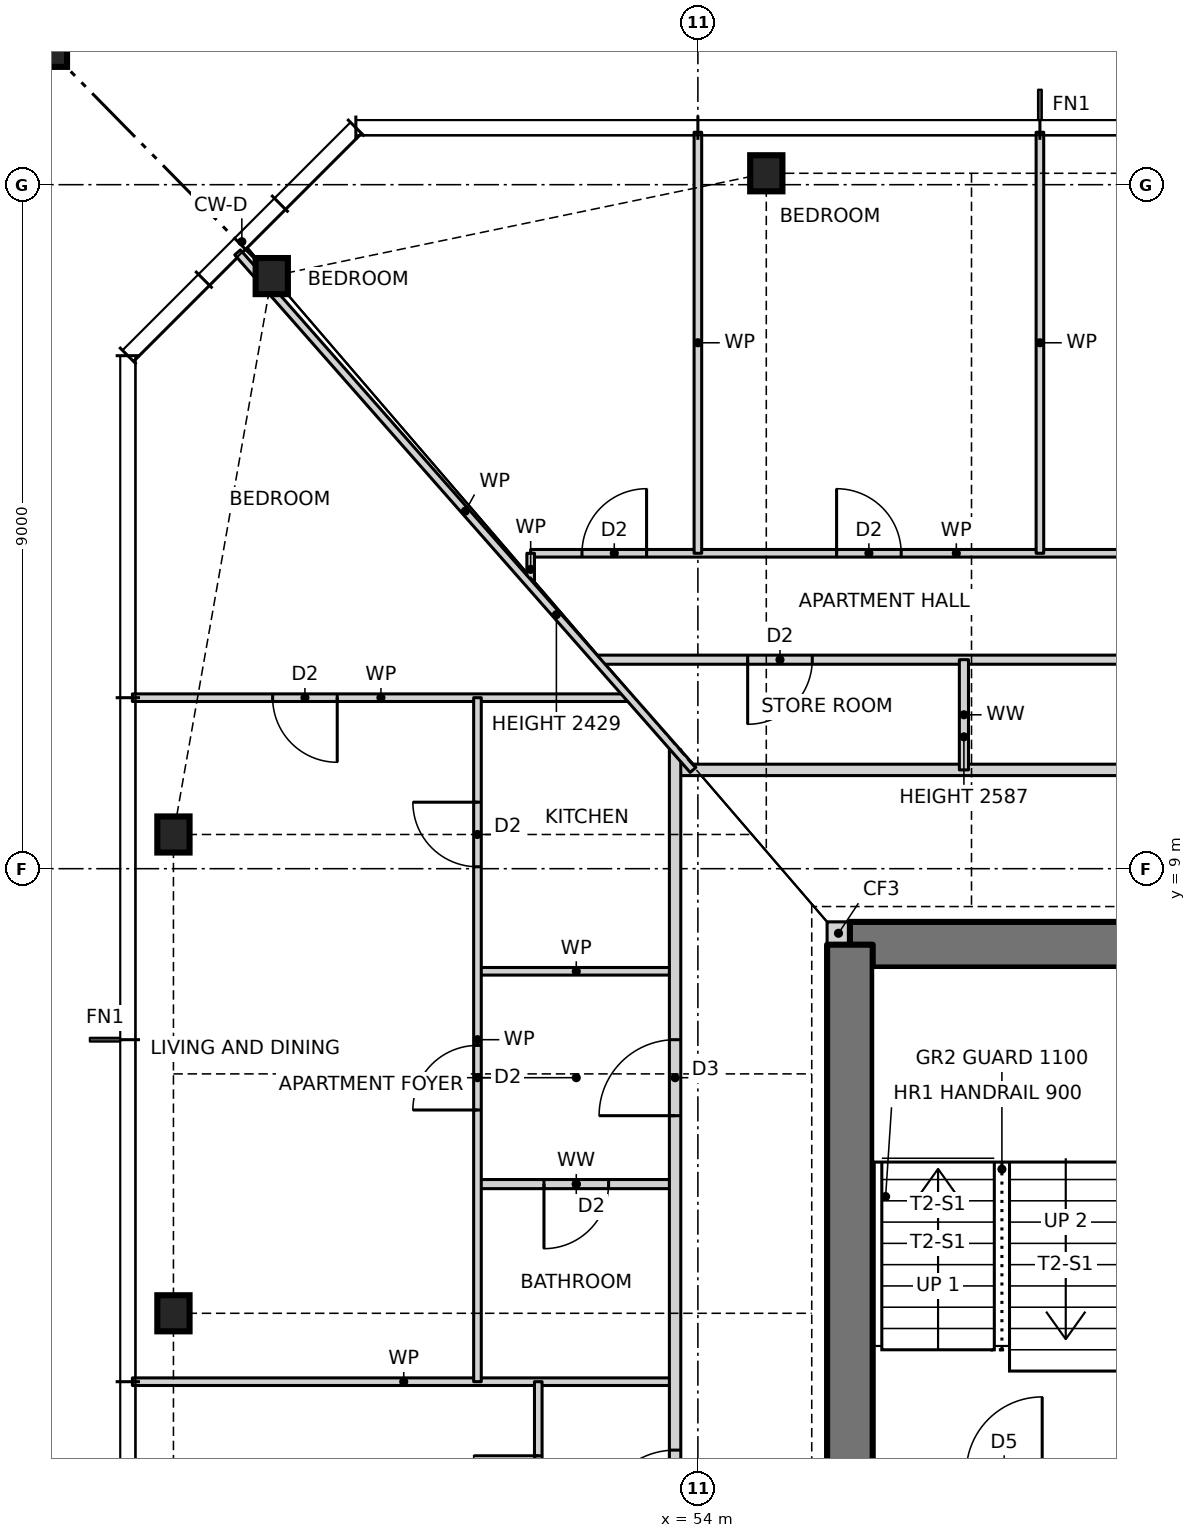
"""IFC4 building model, lengths in metres.
Left out: names, types, materials, properties, quantities, classifications, styles, units other than length and angle.
Written with IfcOpenShell. Run it as: python <this file> out.ifc"""

import sys

from ifc_helpers import new_model, si_unit, direction, frame, frame_2d, origin, origin_2d, place, context, subcontext, project, spatial, rectangle, hollow_rectangle, i_section, extrude, element, fill, save


model = new_model("IFC4")
c1 = context("Model", 3, precision=1e-05, world=origin(), true_north=direction((0.0, 1.0)))
c2 = subcontext(c1, "Body", "Model", "MODEL_VIEW")
j1 = project(units=[si_unit("LENGTHUNIT", "METRE"), si_unit("PLANEANGLEUNIT", "RADIAN")], contexts=[c1])
p1 = place(None, origin())
s1 = spatial("IfcSite", under=j1, at=p1, CompositionType="ELEMENT")
p2 = place(p1, origin())
s2 = spatial("IfcBuilding", under=s1, at=p2, CompositionType="ELEMENT")
p3 = place(p2, frame((0.0, 0.0, 53.5)))
s3 = spatial("IfcBuildingStorey", under=s2, at=p3, CompositionType="ELEMENT", Elevation=53.5)
for number, where, z_axis, x_axis in (
    (1, (54.9, 18.15, 0.0), (0.0, 0.0, 1.0), (1.0, 0.0, 0.0)),
    (2, (48.394, 16.797, 0.0), (0.0, 0.0, 1.0), (1.0, 0.0, 0.0)),
    (3, (47.1, 9.45, 0.0), (0.0, 0.0, 1.0), (1.0, 0.0, 0.0)),
    (4, (47.1, 3.15, 0.0), (0.0, 0.0, 1.0), (1.0, 0.0, 0.0)),
):
    element("IfcColumn", number, at=place(p3, frame(where, z_axis=z_axis, x_axis=x_axis)), inside=s3, PredefinedType="COLUMN", context=c2, shape_type="SweptSolid", body=[
        extrude(i_section(OverallWidth=0.424, OverallDepth=0.475, WebThickness=0.048, FlangeThickness=0.077, at=origin_2d()), origin(), (0.0, 0.0, 1.0), 3.5),
    ])
p4 = place(p3, frame((45.1, 20.15, 0.0), z_axis=(0.0, 0.0, 1.0), x_axis=(1.0, 0.0, 0.0)))
e5 = element("IfcColumn", 5, at=p4, inside=s3, PredefinedType="COLUMN", context=c2, shape_type="SweptSolid", body=[
    extrude(hollow_rectangle(XDim=1.2, YDim=1.2, WallThickness=0.07, at=origin_2d()), origin(), (0.0, 0.0, 1.0), 3.5),
])
p5 = place(p3, frame((55.7, 8.15, 0.0), z_axis=(0.0, 0.0, 1.0), x_axis=(1.0, 0.0, 0.0)))
e6 = element("IfcWall", 6, at=p5, inside=s3, PredefinedType="SOLIDWALL", context=c2, shape_type="SweptSolid", body=[
    extrude(rectangle(XDim=0.3, YDim=0.3, at=frame_2d((0.15, 0.0))), origin(), (0.0, 0.0, 1.0), 3.5),
])
p6 = place(p3, frame((70.0, 8.0, 0.0), z_axis=(0.0, 0.0, 1.0), x_axis=(-1.0, 0.0, 0.0)))
e7 = element("IfcWall", 7, at=p6, inside=s3, PredefinedType="SHEAR", context=c2, shape_type="SweptSolid", body=[
    extrude(rectangle(XDim=14.0, YDim=0.6, at=frame_2d((7.0, 0.0))), origin(), (0.0, 0.0, 1.0), 3.5),
])
p7 = place(p6, frame((8.2, 0.0, 0.0)))
e8 = element("IfcOpeningElement", 8, at=p7, cuts=e7, PredefinedType="OPENING", context=c2, shape_type="SweptSolid", body=[
    extrude(rectangle(XDim=0.9, YDim=2.1, at=frame_2d((0.45, 1.05))), frame((0.0, 0.31, 0.0), z_axis=(0.0, -1.0, 0.0), x_axis=(1.0, 0.0, 0.0)), (0.0, 0.0, 1.0), 0.62),
])
p8 = place(p6, frame((3.2, 0.0, 0.0)))
e9 = element("IfcOpeningElement", 9, at=p8, cuts=e7, PredefinedType="OPENING", context=c2, shape_type="SweptSolid", body=[
    extrude(rectangle(XDim=0.9, YDim=2.1, at=frame_2d((0.45, 1.05))), frame((0.0, 0.31, 0.0), z_axis=(0.0, -1.0, 0.0), x_axis=(1.0, 0.0, 0.0)), (0.0, 0.0, 1.0), 0.62),
])
p9 = place(p3, frame((56.0, 8.0, 0.0), z_axis=(0.0, 0.0, 1.0), x_axis=(0.0, -1.0, 0.0)))
e10 = element("IfcWall", 10, at=p9, inside=s3, PredefinedType="SHEAR", context=c2, shape_type="SweptSolid", body=[
    extrude(rectangle(XDim=16.0, YDim=0.6, at=frame_2d((8.0, 0.0))), origin(), (0.0, 0.0, 1.0), 3.5),
])
p10 = place(p9, frame((7.5, 0.0, 0.0)))
e11 = element("IfcOpeningElement", 11, at=p10, cuts=e10, PredefinedType="OPENING", context=c2, shape_type="SweptSolid", body=[
    extrude(rectangle(XDim=1.0, YDim=2.1, at=frame_2d((0.5, 1.05))), frame((0.0, 0.31, 0.0), z_axis=(0.0, -1.0, 0.0), x_axis=(1.0, 0.0, 0.0)), (0.0, 0.0, 1.0), 0.62),
])
p11 = place(p3, frame((46.56, 2.25, 0.0), z_axis=(0.0, 0.0, 1.0), x_axis=(1.0, 0.0, 0.0)))
e12 = element("IfcWall", 12, at=p11, inside=s3, PredefinedType="PARTITIONING", context=c2, shape_type="SweptSolid", body=[
    extrude(rectangle(XDim=7.14, YDim=0.1, at=frame_2d((3.57, 0.0))), origin(), (0.0, 0.0, 1.0), 3.27),
])
p12 = place(p3, frame((51.1, 4.85, 0.0), z_axis=(0.0, 0.0, 1.0), x_axis=(1.0, 0.0, 0.0)))
e13 = element("IfcWall", 13, at=p12, inside=s3, PredefinedType="PARTITIONING", context=c2, shape_type="SweptSolid", body=[
    extrude(rectangle(XDim=2.6, YDim=0.12, at=frame_2d((1.3, 0.0))), origin(), (0.0, 0.0, 1.0), 3.27),
])
p13 = place(p12, frame((0.875, 0.0, 0.0)))
e14 = element("IfcOpeningElement", 14, at=p13, cuts=e13, PredefinedType="OPENING", context=c2, shape_type="SweptSolid", body=[
    extrude(rectangle(XDim=0.85, YDim=2.1, at=frame_2d((0.425, 1.05))), frame((0.0, 0.07, 0.0), z_axis=(0.0, -1.0, 0.0), x_axis=(1.0, 0.0, 0.0)), (0.0, 0.0, 1.0), 0.14),
])
p14 = place(p3, frame((51.1, 7.65, 0.0), z_axis=(0.0, 0.0, 1.0), x_axis=(1.0, 0.0, 0.0)))
e15 = element("IfcWall", 15, at=p14, inside=s3, PredefinedType="PARTITIONING", context=c2, shape_type="SweptSolid", body=[
    extrude(rectangle(XDim=2.6, YDim=0.1, at=frame_2d((1.3, 0.0))), origin(), (0.0, 0.0, 1.0), 3.27),
])
p15 = place(p3, frame((53.7, 10.3, 0.0), z_axis=(0.0, 0.0, 1.0), x_axis=(1.0, 0.0, 0.0)))
e16 = element("IfcWall", 16, at=p15, inside=s3, PredefinedType="PARTITIONING", context=c2, shape_type="SweptSolid", body=[
    extrude(rectangle(XDim=18.6, YDim=0.15, at=frame_2d((9.3, 0.0))), origin(), (0.0, 0.0, 1.0), 3.27),
])
p16 = place(p15, frame((12.8, 0.0, 0.0)))
e17 = element("IfcOpeningElement", 17, at=p16, cuts=e16, PredefinedType="OPENING", context=c2, shape_type="SweptSolid", body=[
    extrude(rectangle(XDim=1.0, YDim=2.1, at=frame_2d((0.5, 1.05))), frame((0.0, 0.085, 0.0), z_axis=(0.0, -1.0, 0.0), x_axis=(1.0, 0.0, 0.0)), (0.0, 0.0, 1.0), 0.17),
])
p17 = place(p3, frame((46.56, 11.25, 0.0), z_axis=(0.0, 0.0, 1.0), x_axis=(1.0, 0.0, 0.0)))
e18 = element("IfcWall", 18, at=p17, inside=s3, PredefinedType="PARTITIONING", context=c2, shape_type="SweptSolid", body=[
    extrude(rectangle(XDim=6.54, YDim=0.1, at=frame_2d((3.27, 0.0))), origin(), (0.0, 0.0, 1.0), 3.27),
])
p18 = place(p17, frame((1.845, 0.0, 0.0)))
e19 = element("IfcOpeningElement", 19, at=p18, cuts=e18, PredefinedType="OPENING", context=c2, shape_type="SweptSolid", body=[
    extrude(rectangle(XDim=0.85, YDim=2.1, at=frame_2d((0.425, 1.05))), frame((0.0, 0.06, 0.0), z_axis=(0.0, -1.0, 0.0), x_axis=(1.0, 0.0, 0.0)), (0.0, 0.0, 1.0), 0.12),
])
p19 = place(p3, frame((52.66, 11.75, 0.0), z_axis=(0.0, 0.0, 1.0), x_axis=(1.0, 0.0, 0.0)))
e20 = element("IfcWall", 20, at=p19, inside=s3, PredefinedType="PARTITIONING", context=c2, shape_type="SweptSolid", body=[
    extrude(rectangle(XDim=19.34, YDim=0.12, at=frame_2d((9.67, 0.0))), origin(), (0.0, 0.0, 1.0), 3.27),
])
p20 = place(p19, frame((17.115, 0.0, 0.0)))
e21 = element("IfcOpeningElement", 21, at=p20, cuts=e20, PredefinedType="OPENING", context=c2, shape_type="SweptSolid", body=[
    extrude(rectangle(XDim=0.85, YDim=2.1, at=frame_2d((0.425, 1.05))), frame((0.0, 0.07, 0.0), z_axis=(0.0, -1.0, 0.0), x_axis=(1.0, 0.0, 0.0)), (0.0, 0.0, 1.0), 0.14),
])
p21 = place(p19, frame((13.915, 0.0, 0.0)))
e22 = element("IfcOpeningElement", 22, at=p21, cuts=e20, PredefinedType="OPENING", context=c2, shape_type="SweptSolid", body=[
    extrude(rectangle(XDim=0.85, YDim=2.1, at=frame_2d((0.425, 1.05))), frame((0.0, 0.07, 0.0), z_axis=(0.0, -1.0, 0.0), x_axis=(1.0, 0.0, 0.0)), (0.0, 0.0, 1.0), 0.14),
])
p22 = place(p19, frame((7.165, 0.0, 0.0)))
e23 = element("IfcOpeningElement", 23, at=p22, cuts=e20, PredefinedType="OPENING", context=c2, shape_type="SweptSolid", body=[
    extrude(rectangle(XDim=0.85, YDim=2.1, at=frame_2d((0.425, 1.05))), frame((0.0, 0.07, 0.0), z_axis=(0.0, -1.0, 0.0), x_axis=(1.0, 0.0, 0.0)), (0.0, 0.0, 1.0), 0.14),
])
p23 = place(p19, frame((1.995, 0.0, 0.0)))
e24 = element("IfcOpeningElement", 24, at=p23, cuts=e20, PredefinedType="OPENING", context=c2, shape_type="SweptSolid", body=[
    extrude(rectangle(XDim=0.85, YDim=2.1, at=frame_2d((0.425, 1.05))), frame((0.0, 0.07, 0.0), z_axis=(0.0, -1.0, 0.0), x_axis=(1.0, 0.0, 0.0)), (0.0, 0.0, 1.0), 0.14),
])
p24 = place(p3, frame((51.8, 13.15, 0.0), z_axis=(0.0, 0.0, 1.0), x_axis=(1.0, 0.0, 0.0)))
e25 = element("IfcWall", 25, at=p24, inside=s3, PredefinedType="PARTITIONING", context=c2, shape_type="SweptSolid", body=[
    extrude(rectangle(XDim=11.2, YDim=0.1, at=frame_2d((5.6, 0.0))), origin(), (0.0, 0.0, 1.0), 3.27),
])
p25 = place(p24, frame((8.525, 0.0, 0.0)))
e26 = element("IfcOpeningElement", 26, at=p25, cuts=e25, PredefinedType="OPENING", context=c2, shape_type="SweptSolid", body=[
    extrude(rectangle(XDim=0.85, YDim=2.1, at=frame_2d((0.425, 1.05))), frame((0.0, 0.06, 0.0), z_axis=(0.0, -1.0, 0.0), x_axis=(1.0, 0.0, 0.0)), (0.0, 0.0, 1.0), 0.12),
])
p26 = place(p24, frame((4.025, 0.0, 0.0)))
e27 = element("IfcOpeningElement", 27, at=p26, cuts=e25, PredefinedType="OPENING", context=c2, shape_type="SweptSolid", body=[
    extrude(rectangle(XDim=0.85, YDim=2.1, at=frame_2d((0.425, 1.05))), frame((0.0, 0.06, 0.0), z_axis=(0.0, -1.0, 0.0), x_axis=(1.0, 0.0, 0.0)), (0.0, 0.0, 1.0), 0.12),
])
p27 = place(p24, frame((0.675, 0.0, 0.0)))
e28 = element("IfcOpeningElement", 28, at=p27, cuts=e25, PredefinedType="OPENING", context=c2, shape_type="SweptSolid", body=[
    extrude(rectangle(XDim=0.85, YDim=2.1, at=frame_2d((0.425, 1.05))), frame((0.0, 0.06, 0.0), z_axis=(0.0, -1.0, 0.0), x_axis=(1.0, 0.0, 0.0)), (0.0, 0.0, 1.0), 0.12),
])
p28 = place(p3, frame((58.5, 13.15, 0.0), z_axis=(0.0, 0.0, 1.0), x_axis=(0.0, 1.0, 0.0)))
e29 = element("IfcWall", 29, at=p28, inside=s3, PredefinedType="PARTITIONING", context=c2, shape_type="SweptSolid", body=[
    extrude(rectangle(XDim=5.54, YDim=0.1, at=frame_2d((2.77, 0.0))), origin(), (0.0, 0.0, 1.0), 3.27),
])
p29 = place(p3, frame((57.5, 10.3, 0.0), z_axis=(0.0, 0.0, 1.0), x_axis=(0.0, 1.0, 0.0)))
e30 = element("IfcWall", 30, at=p29, inside=s3, PredefinedType="PARTITIONING", context=c2, shape_type="SweptSolid", body=[
    extrude(rectangle(XDim=1.45, YDim=0.12, at=frame_2d((0.725, 0.0))), origin(), (0.0, 0.0, 1.0), 2.587),
])
p30 = place(p3, frame((54.0, 13.15, 0.0), z_axis=(0.0, 0.0, 1.0), x_axis=(0.0, 1.0, 0.0)))
e31 = element("IfcWall", 31, at=p30, inside=s3, PredefinedType="PARTITIONING", context=c2, shape_type="SweptSolid", body=[
    extrude(rectangle(XDim=5.54, YDim=0.1, at=frame_2d((2.77, 0.0))), origin(), (0.0, 0.0, 1.0), 3.27),
])
p31 = place(p3, frame((53.7, -10.568, 0.0), z_axis=(0.0, 0.0, 1.0), x_axis=(0.0, 1.0, 0.0)))
e32 = element("IfcWall", 32, at=p31, inside=s3, PredefinedType="PARTITIONING", context=c2, shape_type="SweptSolid", body=[
    extrude(rectangle(XDim=21.136, YDim=0.15, at=frame_2d((10.568, 0.0))), origin(), (0.0, 0.0, 1.0), 3.27),
])
p32 = place(p31, frame((16.318, 0.0, 0.0)))
e33 = element("IfcOpeningElement", 33, at=p32, cuts=e32, PredefinedType="OPENING", context=c2, shape_type="SweptSolid", body=[
    extrude(rectangle(XDim=1.0, YDim=2.1, at=frame_2d((0.5, 1.05))), frame((0.0, 0.085, 0.0), z_axis=(0.0, -1.0, 0.0), x_axis=(1.0, 0.0, 0.0)), (0.0, 0.0, 1.0), 0.17),
])
p33 = place(p31, frame((10.918, 0.0, 0.0)))
e34 = element("IfcOpeningElement", 34, at=p33, cuts=e32, PredefinedType="OPENING", context=c2, shape_type="SweptSolid", body=[
    extrude(rectangle(XDim=1.0, YDim=2.1, at=frame_2d((0.5, 1.05))), frame((0.0, 0.085, 0.0), z_axis=(0.0, -1.0, 0.0), x_axis=(1.0, 0.0, 0.0)), (0.0, 0.0, 1.0), 0.17),
])
p34 = place(p3, frame((51.9, -0.55, 0.0), z_axis=(0.0, 0.0, 1.0), x_axis=(0.0, 1.0, 0.0)))
e35 = element("IfcWall", 35, at=p34, inside=s3, PredefinedType="PARTITIONING", context=c2, shape_type="SweptSolid", body=[
    extrude(rectangle(XDim=2.8, YDim=0.1, at=frame_2d((1.4, 0.0))), origin(), (0.0, 0.0, 1.0), 3.27),
])
p35 = place(p34, frame((0.975, 0.0, 0.0)))
e36 = element("IfcOpeningElement", 36, at=p35, cuts=e35, PredefinedType="OPENING", context=c2, shape_type="SweptSolid", body=[
    extrude(rectangle(XDim=0.85, YDim=2.1, at=frame_2d((0.425, 1.05))), frame((0.0, 0.06, 0.0), z_axis=(0.0, -1.0, 0.0), x_axis=(1.0, 0.0, 0.0)), (0.0, 0.0, 1.0), 0.12),
])
p36 = place(p3, frame((51.8, 12.727, 0.0), z_axis=(0.0, 0.0, 1.0), x_axis=(0.0, 1.0, 0.0)))
e37 = element("IfcWall", 37, at=p36, inside=s3, PredefinedType="PARTITIONING", context=c2, shape_type="SweptSolid", body=[
    extrude(rectangle(XDim=0.423, YDim=0.1, at=frame_2d((0.211, 0.0))), origin(), (0.0, 0.0, 1.0), 3.27),
])
p37 = place(p3, frame((51.1, 2.25, 0.0), z_axis=(0.0, 0.0, 1.0), x_axis=(0.0, 1.0, 0.0)))
e38 = element("IfcWall", 38, at=p37, inside=s3, PredefinedType="PARTITIONING", context=c2, shape_type="SweptSolid", body=[
    extrude(rectangle(XDim=9.0, YDim=0.1, at=frame_2d((4.5, 0.0))), origin(), (0.0, 0.0, 1.0), 3.27),
])
p38 = place(p37, frame((6.775, 0.0, 0.0)))
e39 = element("IfcOpeningElement", 39, at=p38, cuts=e38, PredefinedType="OPENING", context=c2, shape_type="SweptSolid", body=[
    extrude(rectangle(XDim=0.85, YDim=2.1, at=frame_2d((0.425, 1.05))), frame((0.0, 0.06, 0.0), z_axis=(0.0, -1.0, 0.0), x_axis=(1.0, 0.0, 0.0)), (0.0, 0.0, 1.0), 0.12),
])
p39 = place(p37, frame((3.575, 0.0, 0.0)))
e40 = element("IfcOpeningElement", 40, at=p39, cuts=e38, PredefinedType="OPENING", context=c2, shape_type="SweptSolid", body=[
    extrude(rectangle(XDim=0.85, YDim=2.1, at=frame_2d((0.425, 1.05))), frame((0.0, 0.06, 0.0), z_axis=(0.0, -1.0, 0.0), x_axis=(1.0, 0.0, 0.0)), (0.0, 0.0, 1.0), 0.12),
])
p40 = place(p3, frame((53.936, 10.3, 0.0), z_axis=(0.0, 0.0, 1.0), x_axis=(-0.660638210404, 0.750704439146, 0.0)))
e41 = element("IfcWall", 41, at=p40, inside=s3, PredefinedType="PARTITIONING", context=c2, shape_type="SweptSolid", body=[
    extrude(rectangle(XDim=9.07, YDim=0.1, at=frame_2d((4.535, 0.0))), origin(), (0.0, 0.0, 1.0), 2.429),
])
p41 = place(p26, origin())
e42 = element("IfcDoor", 42, at=p41, inside=s3, OperationType="SINGLE_SWING_LEFT", PredefinedType="DOOR", context=c2, shape_type="SweptSolid", body=[
    extrude(rectangle(XDim=0.85, YDim=2.1, at=frame_2d((0.425, 1.05))), frame((0.0, 0.025, 0.0), z_axis=(0.0, -1.0, 0.0), x_axis=(1.0, 0.0, 0.0)), (0.0, 0.0, 1.0), 0.05),
])
fill(e27, e42)
p42 = place(p27, origin())
e43 = element("IfcDoor", 43, at=p42, inside=s3, OperationType="SINGLE_SWING_RIGHT", PredefinedType="DOOR", context=c2, shape_type="SweptSolid", body=[
    extrude(rectangle(XDim=0.85, YDim=2.1, at=frame_2d((0.425, 1.05))), frame((0.0, 0.025, 0.0), z_axis=(0.0, -1.0, 0.0), x_axis=(1.0, 0.0, 0.0)), (0.0, 0.0, 1.0), 0.05),
])
fill(e28, e43)
p43 = place(p23, frame((0.85, 0.0, 0.0), z_axis=(0.0, 0.0, 1.0), x_axis=(-1.0, 0.0, 0.0)))
e44 = element("IfcDoor", 44, at=p43, inside=s3, OperationType="SINGLE_SWING_RIGHT", PredefinedType="DOOR", context=c2, shape_type="SweptSolid", body=[
    extrude(rectangle(XDim=0.85, YDim=2.1, at=frame_2d((0.425, 1.05))), frame((0.0, 0.025, 0.0), z_axis=(0.0, -1.0, 0.0), x_axis=(1.0, 0.0, 0.0)), (0.0, 0.0, 1.0), 0.05),
])
fill(e24, e44)
p44 = place(p38, origin())
e45 = element("IfcDoor", 45, at=p44, inside=s3, OperationType="SINGLE_SWING_RIGHT", PredefinedType="DOOR", context=c2, shape_type="SweptSolid", body=[
    extrude(rectangle(XDim=0.85, YDim=2.1, at=frame_2d((0.425, 1.05))), frame((0.0, 0.025, 0.0), z_axis=(0.0, -1.0, 0.0), x_axis=(1.0, 0.0, 0.0)), (0.0, 0.0, 1.0), 0.05),
])
fill(e39, e45)
p45 = place(p32, origin())
e46 = element("IfcDoor", 46, at=p45, inside=s3, OperationType="SINGLE_SWING_LEFT", PredefinedType="DOOR", context=c2, shape_type="SweptSolid", body=[
    extrude(rectangle(XDim=1.0, YDim=2.1, at=frame_2d((0.5, 1.05))), frame((0.0, 0.025, 0.0), z_axis=(0.0, -1.0, 0.0), x_axis=(1.0, 0.0, 0.0)), (0.0, 0.0, 1.0), 0.05),
])
fill(e33, e46)
p46 = place(p39, origin())
e47 = element("IfcDoor", 47, at=p46, inside=s3, OperationType="SINGLE_SWING_LEFT", PredefinedType="DOOR", context=c2, shape_type="SweptSolid", body=[
    extrude(rectangle(XDim=0.85, YDim=2.1, at=frame_2d((0.425, 1.05))), frame((0.0, 0.025, 0.0), z_axis=(0.0, -1.0, 0.0), x_axis=(1.0, 0.0, 0.0)), (0.0, 0.0, 1.0), 0.05),
])
fill(e40, e47)
p47 = place(p13, frame((0.85, 0.0, 0.0), z_axis=(0.0, 0.0, 1.0), x_axis=(-1.0, 0.0, 0.0)))
e48 = element("IfcDoor", 48, at=p47, inside=s3, OperationType="SINGLE_SWING_RIGHT", PredefinedType="DOOR", context=c2, shape_type="SweptSolid", body=[
    extrude(rectangle(XDim=0.85, YDim=2.1, at=frame_2d((0.425, 1.05))), frame((0.0, 0.025, 0.0), z_axis=(0.0, -1.0, 0.0), x_axis=(1.0, 0.0, 0.0)), (0.0, 0.0, 1.0), 0.05),
])
fill(e14, e48)
p48 = place(p18, frame((0.85, 0.0, 0.0), z_axis=(0.0, 0.0, 1.0), x_axis=(-1.0, 0.0, 0.0)))
e49 = element("IfcDoor", 49, at=p48, inside=s3, OperationType="SINGLE_SWING_LEFT", PredefinedType="DOOR", context=c2, shape_type="SweptSolid", body=[
    extrude(rectangle(XDim=0.85, YDim=2.1, at=frame_2d((0.425, 1.05))), frame((0.0, 0.025, 0.0), z_axis=(0.0, -1.0, 0.0), x_axis=(1.0, 0.0, 0.0)), (0.0, 0.0, 1.0), 0.05),
])
fill(e19, e49)
p49 = place(p33, origin())
e50 = element("IfcDoor", 50, at=p49, inside=s3, OperationType="SINGLE_SWING_LEFT", PredefinedType="DOOR", context=c2, shape_type="SweptSolid", body=[
    extrude(rectangle(XDim=1.0, YDim=2.1, at=frame_2d((0.5, 1.05))), frame((0.0, 0.025, 0.0), z_axis=(0.0, -1.0, 0.0), x_axis=(1.0, 0.0, 0.0)), (0.0, 0.0, 1.0), 0.05),
])
fill(e34, e50)
p50 = place(p35, origin())
e51 = element("IfcDoor", 51, at=p50, inside=s3, OperationType="SINGLE_SWING_RIGHT", PredefinedType="DOOR", context=c2, shape_type="SweptSolid", body=[
    extrude(rectangle(XDim=0.85, YDim=2.1, at=frame_2d((0.425, 1.05))), frame((0.0, 0.025, 0.0), z_axis=(0.0, -1.0, 0.0), x_axis=(1.0, 0.0, 0.0)), (0.0, 0.0, 1.0), 0.05),
])
fill(e36, e51)
save(model, sys.argv[1])
